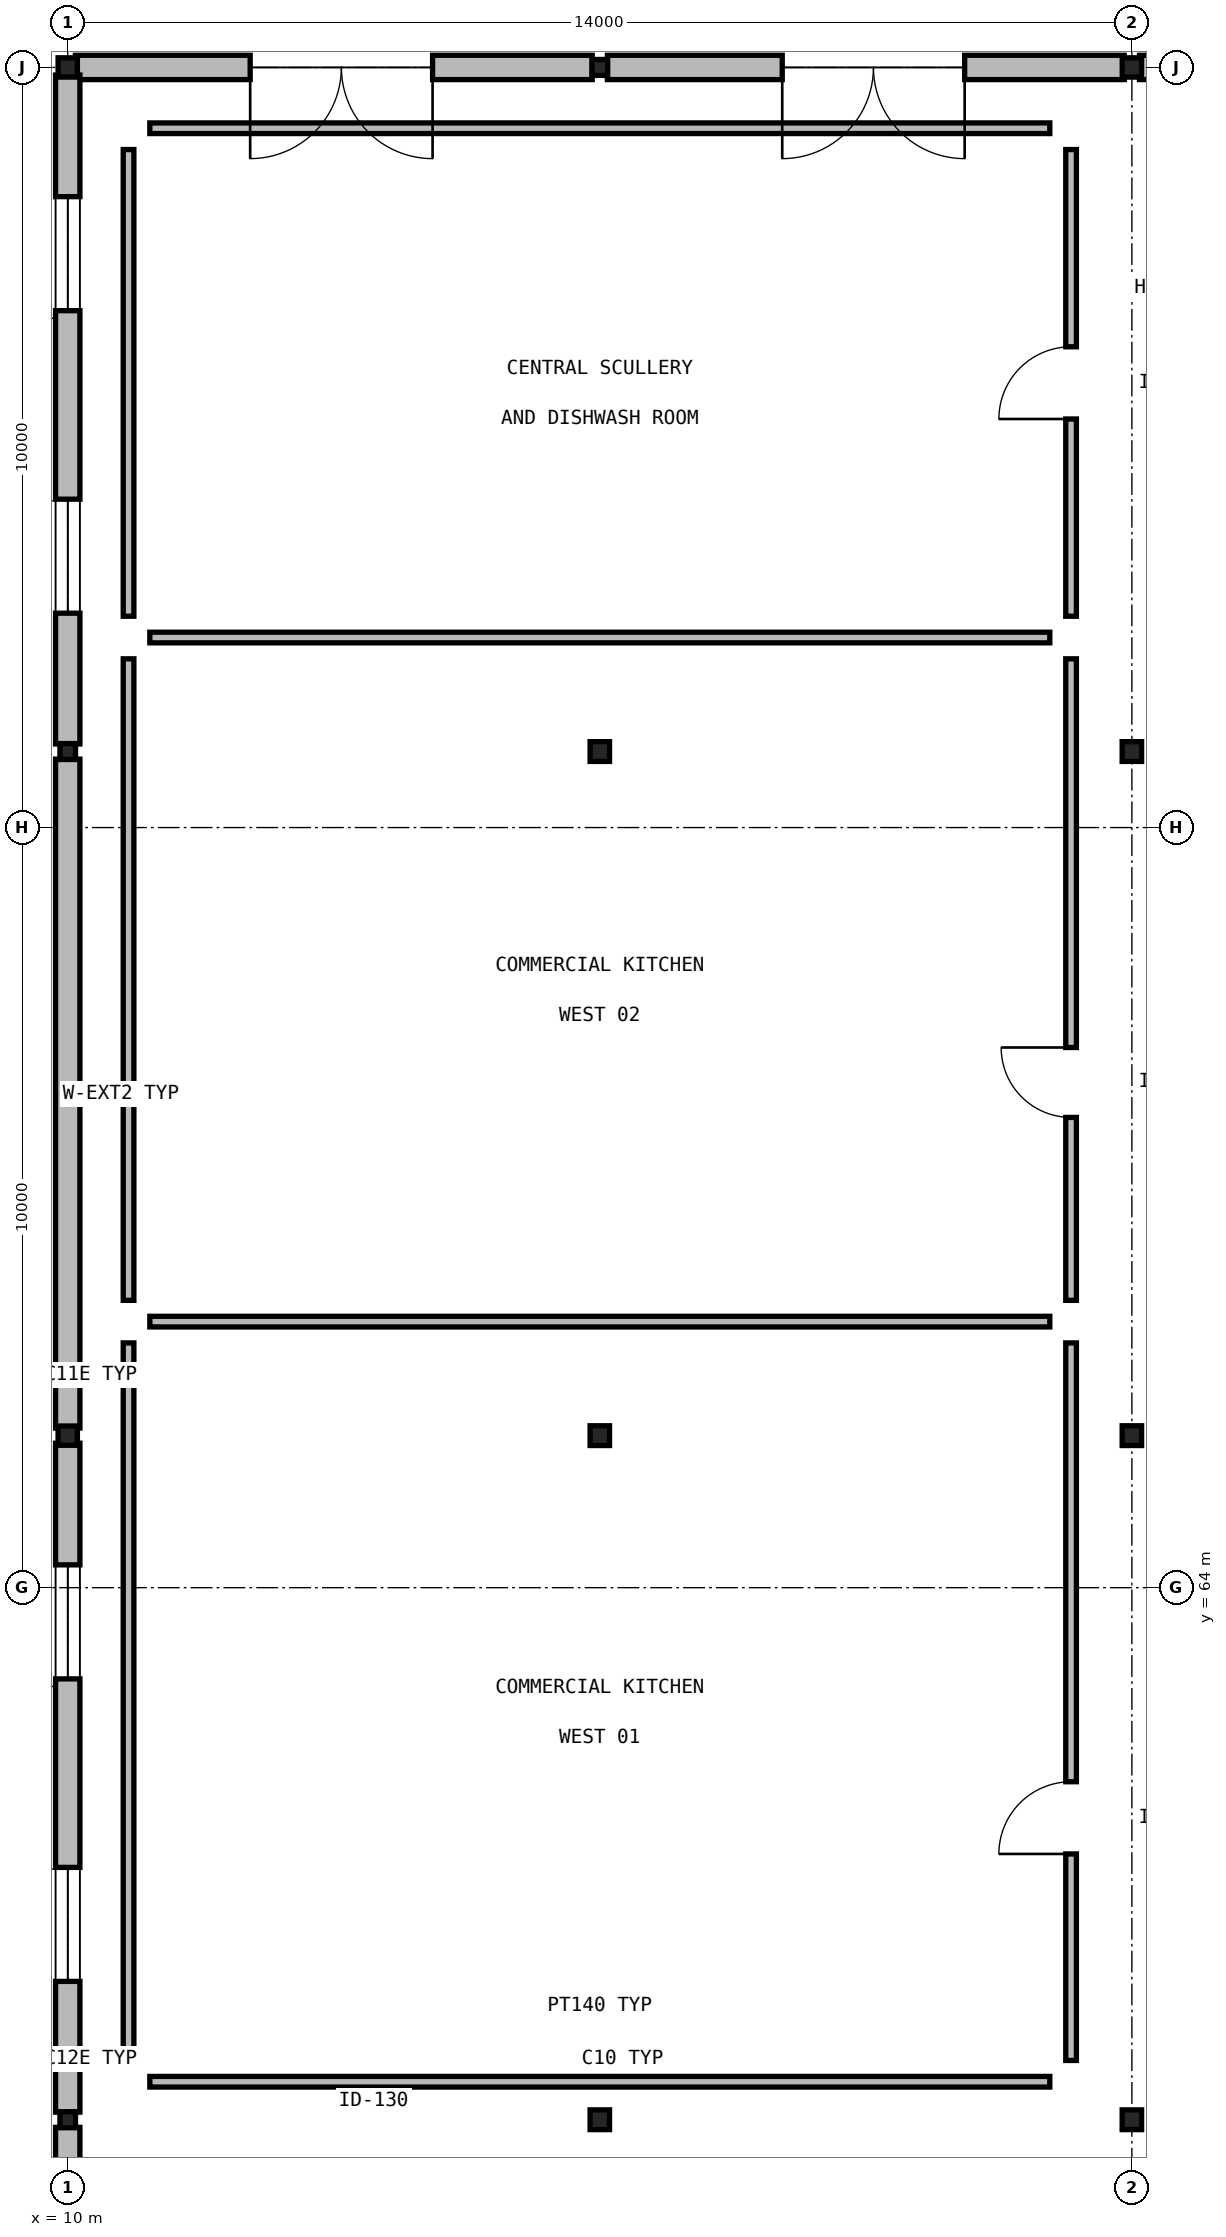
"""IFC4 building model, lengths in metres.
Left out: names, types, materials, properties, quantities, classifications, styles, units other than length and angle.
Written with IfcOpenShell. Run it as: python <this file> out.ifc"""

import sys

from ifc_helpers import new_model, si_unit, direction, frame, frame_2d, origin, origin_2d_with_axis, place, context, subcontext, project, spatial, rectangle, i_section, extrude, element, fill, save


model = new_model("IFC4")
c1 = context("Model", 3, precision=1e-05, world=origin(), true_north=direction((0.0, 1.0)))
c2 = subcontext(c1, "Body", "Model", "MODEL_VIEW")
j1 = project(units=[si_unit("LENGTHUNIT", "METRE"), si_unit("PLANEANGLEUNIT", "RADIAN")], contexts=[c1])
p1 = place(None, origin())
s1 = spatial("IfcSite", under=j1, at=p1, CompositionType="ELEMENT")
p2 = place(p1, origin())
s2 = spatial("IfcBuilding", under=s1, at=p2, CompositionType="ELEMENT")
p3 = place(p2, origin())
s3 = spatial("IfcBuildingStorey", under=s2, at=p3, CompositionType="ELEMENT", Elevation=0.0)
p4 = place(p3, frame((10.0, 57.0, -0.28), z_axis=(0.0, 0.0, 1.0), x_axis=(1.0, 0.0, 0.0)))
e1 = element("IfcColumn", 1, at=p4, inside=s3, PredefinedType="COLUMN", context=c2, shape_type="SweptSolid", body=[
    extrude(i_section(OverallWidth=0.205, OverallDepth=0.21, WebThickness=0.009, FlangeThickness=0.014, FilletRadius=0.011, at=origin_2d_with_axis()), origin(), (0.0, 0.0, 1.0), 4.78),
])
p5 = place(p3, frame((10.0, 66.0, -0.28), z_axis=(0.0, 0.0, 1.0), x_axis=(1.0, 0.0, 0.0)))
e2 = element("IfcColumn", 2, at=p5, inside=s3, PredefinedType="COLUMN", context=c2, shape_type="SweptSolid", body=[
    extrude(i_section(OverallWidth=0.254, OverallDepth=0.254, WebThickness=0.009, FlangeThickness=0.014, FilletRadius=0.014, at=origin_2d_with_axis()), origin(), (0.0, 0.0, 1.0), 4.78),
])
p6 = place(p3, frame((10.0, 75.0, -0.28), z_axis=(0.0, 0.0, 1.0), x_axis=(1.0, 0.0, 0.0)))
e3 = element("IfcColumn", 3, at=p6, inside=s3, PredefinedType="COLUMN", context=c2, shape_type="SweptSolid", body=[
    extrude(i_section(OverallWidth=0.205, OverallDepth=0.21, WebThickness=0.009, FlangeThickness=0.014, FilletRadius=0.011, at=origin_2d_with_axis()), origin(), (0.0, 0.0, 1.0), 4.78),
])
p7 = place(p3, frame((10.0, 84.0, -0.28), z_axis=(0.0, 0.0, 1.0), x_axis=(1.0, 0.0, 0.0)))
e4 = element("IfcColumn", 4, at=p7, inside=s3, PredefinedType="COLUMN", context=c2, shape_type="SweptSolid", body=[
    extrude(i_section(OverallWidth=0.254, OverallDepth=0.254, WebThickness=0.009, FlangeThickness=0.014, FilletRadius=0.014, at=origin_2d_with_axis()), origin(), (0.0, 0.0, 1.0), 4.78),
])
for number, where, z_axis, x_axis in (
    (5, (17.0, 57.0, -0.28), (0.0, 0.0, 1.0), (1.0, 0.0, 0.0)),
    (6, (17.0, 66.0, -0.28), (0.0, 0.0, 1.0), (1.0, 0.0, 0.0)),
    (7, (17.0, 75.0, -0.28), (0.0, 0.0, 1.0), (1.0, 0.0, 0.0)),
):
    element("IfcColumn", number, at=place(p3, frame(where, z_axis=z_axis, x_axis=x_axis)), inside=s3, PredefinedType="COLUMN", context=c2, shape_type="SweptSolid", body=[
        extrude(i_section(OverallWidth=0.256, OverallDepth=0.26, WebThickness=0.01, FlangeThickness=0.017, FilletRadius=0.014, at=origin_2d_with_axis()), origin(), (0.0, 0.0, 1.0), 4.78),
    ])
p8 = place(p3, frame((17.0, 84.0, -0.28), z_axis=(0.0, 0.0, 1.0), x_axis=(1.0, 0.0, 0.0)))
e8 = element("IfcColumn", 8, at=p8, inside=s3, PredefinedType="COLUMN", context=c2, shape_type="SweptSolid", body=[
    extrude(i_section(OverallWidth=0.205, OverallDepth=0.21, WebThickness=0.009, FlangeThickness=0.014, FilletRadius=0.011, at=origin_2d_with_axis()), origin(), (0.0, 0.0, 1.0), 4.78),
])
for number, where, z_axis, x_axis in (
    (9, (24.0, 57.0, -0.28), (0.0, 0.0, 1.0), (1.0, 0.0, 0.0)),
    (10, (24.0, 66.0, -0.28), (0.0, 0.0, 1.0), (1.0, 0.0, 0.0)),
    (11, (24.0, 75.0, -0.28), (0.0, 0.0, 1.0), (1.0, 0.0, 0.0)),
):
    element("IfcColumn", number, at=place(p3, frame(where, z_axis=z_axis, x_axis=x_axis)), inside=s3, PredefinedType="COLUMN", context=c2, shape_type="SweptSolid", body=[
        extrude(i_section(OverallWidth=0.256, OverallDepth=0.26, WebThickness=0.01, FlangeThickness=0.017, FilletRadius=0.014, at=origin_2d_with_axis()), origin(), (0.0, 0.0, 1.0), 4.78),
    ])
p9 = place(p3, frame((24.0, 84.0, -0.28), z_axis=(0.0, 0.0, 1.0), x_axis=(1.0, 0.0, 0.0)))
e12 = element("IfcColumn", 12, at=p9, inside=s3, PredefinedType="COLUMN", context=c2, shape_type="SweptSolid", body=[
    extrude(i_section(OverallWidth=0.254, OverallDepth=0.254, WebThickness=0.009, FlangeThickness=0.014, FilletRadius=0.014, at=origin_2d_with_axis()), origin(), (0.0, 0.0, 1.0), 4.78),
])
p10 = place(p3, frame((16.9, 84.0, 0.0), z_axis=(0.0, 0.0, 1.0), x_axis=(-1.0, 0.0, 0.0)))
e13 = element("IfcWall", 13, at=p10, inside=s3, PredefinedType="SOLIDWALL", context=c2, shape_type="SweptSolid", body=[
    extrude(rectangle(XDim=6.8, YDim=0.32, at=frame_2d((3.4, 0.0), x_axis=(1.0, 0.0))), origin(), (0.0, 0.0, 1.0), 3.88),
])
p11 = place(p10, frame((2.1, 0.0, 0.0)))
e14 = element("IfcOpeningElement", 14, at=p11, cuts=e13, PredefinedType="OPENING", context=c2, shape_type="SweptSolid", body=[
    extrude(rectangle(XDim=2.4, YDim=2.8, at=frame_2d((1.2, 1.4), x_axis=(1.0, 0.0))), frame((0.0, 0.17, 0.0), z_axis=(0.0, -1.0, 0.0), x_axis=(1.0, 0.0, 0.0)), (0.0, 0.0, 1.0), 0.34),
])
p12 = place(p3, frame((23.9, 84.0, 0.0), z_axis=(0.0, 0.0, 1.0), x_axis=(-1.0, 0.0, 0.0)))
e15 = element("IfcWall", 15, at=p12, inside=s3, PredefinedType="SOLIDWALL", context=c2, shape_type="SweptSolid", body=[
    extrude(rectangle(XDim=6.8, YDim=0.32, at=frame_2d((3.4, 0.0), x_axis=(1.0, 0.0))), origin(), (0.0, 0.0, 1.0), 3.88),
])
p13 = place(p12, frame((2.1, 0.0, 0.0)))
e16 = element("IfcOpeningElement", 16, at=p13, cuts=e15, PredefinedType="OPENING", context=c2, shape_type="SweptSolid", body=[
    extrude(rectangle(XDim=2.4, YDim=2.8, at=frame_2d((1.2, 1.4), x_axis=(1.0, 0.0))), frame((0.0, 0.17, 0.0), z_axis=(0.0, -1.0, 0.0), x_axis=(1.0, 0.0, 0.0)), (0.0, 0.0, 1.0), 0.34),
])
p14 = place(p3, frame((30.9, 84.0, 0.0), z_axis=(0.0, 0.0, 1.0), x_axis=(-1.0, 0.0, 0.0)))
e17 = element("IfcWall", 17, at=p14, inside=s3, PredefinedType="SOLIDWALL", context=c2, shape_type="SweptSolid", body=[
    extrude(rectangle(XDim=6.8, YDim=0.32, at=frame_2d((3.4, 0.0), x_axis=(1.0, 0.0))), origin(), (0.0, 0.0, 1.0), 3.88),
])
p15 = place(p14, frame((2.1, 0.0, 0.0)))
e18 = element("IfcOpeningElement", 18, at=p15, cuts=e17, PredefinedType="OPENING", context=c2, shape_type="SweptSolid", body=[
    extrude(rectangle(XDim=2.4, YDim=2.8, at=frame_2d((1.2, 1.4), x_axis=(1.0, 0.0))), frame((0.0, 0.17, 0.0), z_axis=(0.0, -1.0, 0.0), x_axis=(1.0, 0.0, 0.0)), (0.0, 0.0, 1.0), 0.34),
])
p16 = place(p3, frame((10.0, 56.9, 0.0), z_axis=(0.0, 0.0, 1.0), x_axis=(0.0, -1.0, 0.0)))
e19 = element("IfcWall", 19, at=p16, inside=s3, PredefinedType="SOLIDWALL", context=c2, shape_type="SweptSolid", body=[
    extrude(rectangle(XDim=8.8, YDim=0.32, at=frame_2d((4.4, 0.0), x_axis=(1.0, 0.0))), origin(), (0.0, 0.0, 1.0), 3.88),
])
p17 = place(p16, frame((1.6, 0.0, 1.05)))
e20 = element("IfcOpeningElement", 20, at=p17, cuts=e19, PredefinedType="OPENING", context=c2, shape_type="SweptSolid", body=[
    extrude(rectangle(XDim=1.5, YDim=1.6, at=frame_2d((0.75, 0.8), x_axis=(1.0, 0.0))), frame((0.0, 0.17, 0.0), z_axis=(0.0, -1.0, 0.0), x_axis=(1.0, 0.0, 0.0)), (0.0, 0.0, 1.0), 0.34),
])
p18 = place(p16, frame((5.58, 0.0, 1.05)))
e21 = element("IfcOpeningElement", 21, at=p18, cuts=e19, PredefinedType="OPENING", context=c2, shape_type="SweptSolid", body=[
    extrude(rectangle(XDim=1.5, YDim=1.6, at=frame_2d((0.75, 0.8), x_axis=(1.0, 0.0))), frame((0.0, 0.17, 0.0), z_axis=(0.0, -1.0, 0.0), x_axis=(1.0, 0.0, 0.0)), (0.0, 0.0, 1.0), 0.34),
])
p19 = place(p3, frame((10.0, 65.9, 0.0), z_axis=(0.0, 0.0, 1.0), x_axis=(0.0, -1.0, 0.0)))
e22 = element("IfcWall", 22, at=p19, inside=s3, PredefinedType="SOLIDWALL", context=c2, shape_type="SweptSolid", body=[
    extrude(rectangle(XDim=8.8, YDim=0.32, at=frame_2d((4.4, 0.0), x_axis=(1.0, 0.0))), origin(), (0.0, 0.0, 1.0), 3.88),
])
p20 = place(p19, frame((1.6, 0.0, 1.05)))
e23 = element("IfcOpeningElement", 23, at=p20, cuts=e22, PredefinedType="OPENING", context=c2, shape_type="SweptSolid", body=[
    extrude(rectangle(XDim=1.5, YDim=1.6, at=frame_2d((0.75, 0.8), x_axis=(1.0, 0.0))), frame((0.0, 0.17, 0.0), z_axis=(0.0, -1.0, 0.0), x_axis=(1.0, 0.0, 0.0)), (0.0, 0.0, 1.0), 0.34),
])
p21 = place(p19, frame((5.58, 0.0, 1.05)))
e24 = element("IfcOpeningElement", 24, at=p21, cuts=e22, PredefinedType="OPENING", context=c2, shape_type="SweptSolid", body=[
    extrude(rectangle(XDim=1.5, YDim=1.6, at=frame_2d((0.75, 0.8), x_axis=(1.0, 0.0))), frame((0.0, 0.17, 0.0), z_axis=(0.0, -1.0, 0.0), x_axis=(1.0, 0.0, 0.0)), (0.0, 0.0, 1.0), 0.34),
])
p22 = place(p3, frame((10.0, 74.9, 0.0), z_axis=(0.0, 0.0, 1.0), x_axis=(0.0, -1.0, 0.0)))
e25 = element("IfcWall", 25, at=p22, inside=s3, PredefinedType="SOLIDWALL", context=c2, shape_type="SweptSolid", body=[
    extrude(rectangle(XDim=8.8, YDim=0.32, at=frame_2d((4.4, 0.0), x_axis=(1.0, 0.0))), origin(), (0.0, 0.0, 1.0), 3.88),
])
p23 = place(p3, frame((10.0, 83.9, 0.0), z_axis=(0.0, 0.0, 1.0), x_axis=(0.0, -1.0, 0.0)))
e26 = element("IfcWall", 26, at=p23, inside=s3, PredefinedType="SOLIDWALL", context=c2, shape_type="SweptSolid", body=[
    extrude(rectangle(XDim=8.8, YDim=0.32, at=frame_2d((4.4, 0.0), x_axis=(1.0, 0.0))), origin(), (0.0, 0.0, 1.0), 3.88),
])
p24 = place(p23, frame((1.6, 0.0, 1.05)))
e27 = element("IfcOpeningElement", 27, at=p24, cuts=e26, PredefinedType="OPENING", context=c2, shape_type="SweptSolid", body=[
    extrude(rectangle(XDim=1.5, YDim=1.6, at=frame_2d((0.75, 0.8), x_axis=(1.0, 0.0))), frame((0.0, 0.17, 0.0), z_axis=(0.0, -1.0, 0.0), x_axis=(1.0, 0.0, 0.0)), (0.0, 0.0, 1.0), 0.34),
])
p25 = place(p23, frame((5.58, 0.0, 1.05)))
e28 = element("IfcOpeningElement", 28, at=p25, cuts=e26, PredefinedType="OPENING", context=c2, shape_type="SweptSolid", body=[
    extrude(rectangle(XDim=1.5, YDim=1.6, at=frame_2d((0.75, 0.8), x_axis=(1.0, 0.0))), frame((0.0, 0.17, 0.0), z_axis=(0.0, -1.0, 0.0), x_axis=(1.0, 0.0, 0.0)), (0.0, 0.0, 1.0), 0.34),
])
p26 = place(p3, frame((11.08, 57.5, 0.0), z_axis=(0.0, 0.0, 1.0), x_axis=(1.0, 0.0, 0.0)))
e29 = element("IfcWall", 29, at=p26, inside=s3, PredefinedType="PLUMBINGWALL", context=c2, shape_type="SweptSolid", body=[
    extrude(rectangle(XDim=11.84, YDim=0.14, at=frame_2d((5.92, 0.0), x_axis=(1.0, 0.0))), origin(), (0.0, 0.0, 1.0), 3.62),
])
p27 = place(p3, frame((23.2, 57.78, 0.0), z_axis=(0.0, 0.0, 1.0), x_axis=(0.0, 1.0, 0.0)))
e30 = element("IfcWall", 30, at=p27, inside=s3, PredefinedType="PLUMBINGWALL", context=c2, shape_type="SweptSolid", body=[
    extrude(rectangle(XDim=9.44, YDim=0.14, at=frame_2d((4.72, 0.0), x_axis=(1.0, 0.0))), origin(), (0.0, 0.0, 1.0), 3.62),
])
p28 = place(p27, frame((2.717, 0.0, 0.0)))
e31 = element("IfcOpeningElement", 31, at=p28, cuts=e30, PredefinedType="OPENING", context=c2, shape_type="SweptSolid", body=[
    extrude(rectangle(XDim=0.95, YDim=2.15, at=frame_2d((0.475, 1.075), x_axis=(1.0, 0.0))), frame((0.0, 0.08, 0.0), z_axis=(0.0, -1.0, 0.0), x_axis=(1.0, 0.0, 0.0)), (0.0, 0.0, 1.0), 0.16),
])
p29 = place(p3, frame((22.92, 67.5, 0.0), z_axis=(0.0, 0.0, 1.0), x_axis=(-1.0, 0.0, 0.0)))
e32 = element("IfcWall", 32, at=p29, inside=s3, PredefinedType="PLUMBINGWALL", context=c2, shape_type="SweptSolid", body=[
    extrude(rectangle(XDim=11.84, YDim=0.14, at=frame_2d((5.92, 0.0), x_axis=(1.0, 0.0))), origin(), (0.0, 0.0, 1.0), 3.62),
])
p30 = place(p3, frame((10.8, 67.22, 0.0), z_axis=(0.0, 0.0, 1.0), x_axis=(0.0, -1.0, 0.0)))
e33 = element("IfcWall", 33, at=p30, inside=s3, PredefinedType="PLUMBINGWALL", context=c2, shape_type="SweptSolid", body=[
    extrude(rectangle(XDim=9.44, YDim=0.14, at=frame_2d((4.72, 0.0), x_axis=(1.0, 0.0))), origin(), (0.0, 0.0, 1.0), 3.62),
])
p31 = place(p3, frame((23.2, 67.78, 0.0), z_axis=(0.0, 0.0, 1.0), x_axis=(0.0, 1.0, 0.0)))
e34 = element("IfcWall", 34, at=p31, inside=s3, PredefinedType="PLUMBINGWALL", context=c2, shape_type="SweptSolid", body=[
    extrude(rectangle(XDim=8.44, YDim=0.14, at=frame_2d((4.22, 0.0), x_axis=(1.0, 0.0))), origin(), (0.0, 0.0, 1.0), 3.62),
])
p32 = place(p31, frame((2.406, 0.0, 0.0)))
e35 = element("IfcOpeningElement", 35, at=p32, cuts=e34, PredefinedType="OPENING", context=c2, shape_type="SweptSolid", body=[
    extrude(rectangle(XDim=0.92, YDim=2.15, at=frame_2d((0.46, 1.075), x_axis=(1.0, 0.0))), frame((0.0, 0.08, 0.0), z_axis=(0.0, -1.0, 0.0), x_axis=(1.0, 0.0, 0.0)), (0.0, 0.0, 1.0), 0.16),
])
p33 = place(p3, frame((22.92, 76.5, 0.0), z_axis=(0.0, 0.0, 1.0), x_axis=(-1.0, 0.0, 0.0)))
e36 = element("IfcWall", 36, at=p33, inside=s3, PredefinedType="PLUMBINGWALL", context=c2, shape_type="SweptSolid", body=[
    extrude(rectangle(XDim=11.84, YDim=0.14, at=frame_2d((5.92, 0.0), x_axis=(1.0, 0.0))), origin(), (0.0, 0.0, 1.0), 3.62),
])
p34 = place(p3, frame((10.8, 76.22, 0.0), z_axis=(0.0, 0.0, 1.0), x_axis=(0.0, -1.0, 0.0)))
e37 = element("IfcWall", 37, at=p34, inside=s3, PredefinedType="PLUMBINGWALL", context=c2, shape_type="SweptSolid", body=[
    extrude(rectangle(XDim=8.44, YDim=0.14, at=frame_2d((4.22, 0.0), x_axis=(1.0, 0.0))), origin(), (0.0, 0.0, 1.0), 3.62),
])
p35 = place(p3, frame((23.2, 76.78, 0.0), z_axis=(0.0, 0.0, 1.0), x_axis=(0.0, 1.0, 0.0)))
e38 = element("IfcWall", 38, at=p35, inside=s3, PredefinedType="PLUMBINGWALL", context=c2, shape_type="SweptSolid", body=[
    extrude(rectangle(XDim=6.14, YDim=0.14, at=frame_2d((3.07, 0.0), x_axis=(1.0, 0.0))), origin(), (0.0, 0.0, 1.0), 3.62),
])
p36 = place(p35, frame((2.595, 0.0, 0.0)))
e39 = element("IfcOpeningElement", 39, at=p36, cuts=e38, PredefinedType="OPENING", context=c2, shape_type="SweptSolid", body=[
    extrude(rectangle(XDim=0.95, YDim=2.15, at=frame_2d((0.475, 1.075), x_axis=(1.0, 0.0))), frame((0.0, 0.08, 0.0), z_axis=(0.0, -1.0, 0.0), x_axis=(1.0, 0.0, 0.0)), (0.0, 0.0, 1.0), 0.16),
])
p37 = place(p3, frame((22.92, 83.2, 0.0), z_axis=(0.0, 0.0, 1.0), x_axis=(-1.0, 0.0, 0.0)))
e40 = element("IfcWall", 40, at=p37, inside=s3, PredefinedType="PLUMBINGWALL", context=c2, shape_type="SweptSolid", body=[
    extrude(rectangle(XDim=11.84, YDim=0.14, at=frame_2d((5.92, 0.0), x_axis=(1.0, 0.0))), origin(), (0.0, 0.0, 1.0), 3.62),
])
p38 = place(p3, frame((10.8, 82.92, 0.0), z_axis=(0.0, 0.0, 1.0), x_axis=(0.0, -1.0, 0.0)))
e41 = element("IfcWall", 41, at=p38, inside=s3, PredefinedType="PLUMBINGWALL", context=c2, shape_type="SweptSolid", body=[
    extrude(rectangle(XDim=6.14, YDim=0.14, at=frame_2d((3.07, 0.0), x_axis=(1.0, 0.0))), origin(), (0.0, 0.0, 1.0), 3.62),
])
p39 = place(p11, origin())
e42 = element("IfcDoor", 42, at=p39, inside=s3, OperationType="DOUBLE_SWING_RIGHT", PredefinedType="DOOR", context=c2, shape_type="SweptSolid", body=[
    extrude(rectangle(XDim=2.4, YDim=2.8, at=frame_2d((1.2, 1.4), x_axis=(1.0, 0.0))), frame((0.0, 0.025, 0.0), z_axis=(0.0, -1.0, 0.0), x_axis=(1.0, 0.0, 0.0)), (0.0, 0.0, 1.0), 0.05),
])
fill(e14, e42)
p40 = place(p13, origin())
e43 = element("IfcDoor", 43, at=p40, inside=s3, OperationType="DOUBLE_SWING_RIGHT", PredefinedType="DOOR", context=c2, shape_type="SweptSolid", body=[
    extrude(rectangle(XDim=2.4, YDim=2.8, at=frame_2d((1.2, 1.4), x_axis=(1.0, 0.0))), frame((0.0, 0.025, 0.0), z_axis=(0.0, -1.0, 0.0), x_axis=(1.0, 0.0, 0.0)), (0.0, 0.0, 1.0), 0.05),
])
fill(e16, e43)
p41 = place(p20, origin())
e44 = element("IfcWindow", 44, at=p41, inside=s3, PartitioningType="SINGLE_PANEL", PredefinedType="WINDOW", context=c2, shape_type="SweptSolid", body=[
    extrude(rectangle(XDim=1.5, YDim=1.6, at=frame_2d((0.75, 0.8), x_axis=(1.0, 0.0))), frame((0.0, 0.03, 0.0), z_axis=(0.0, -1.0, 0.0), x_axis=(1.0, 0.0, 0.0)), (0.0, 0.0, 1.0), 0.06),
])
fill(e23, e44)
p42 = place(p21, origin())
e45 = element("IfcWindow", 45, at=p42, inside=s3, PartitioningType="SINGLE_PANEL", PredefinedType="WINDOW", context=c2, shape_type="SweptSolid", body=[
    extrude(rectangle(XDim=1.5, YDim=1.6, at=frame_2d((0.75, 0.8), x_axis=(1.0, 0.0))), frame((0.0, 0.03, 0.0), z_axis=(0.0, -1.0, 0.0), x_axis=(1.0, 0.0, 0.0)), (0.0, 0.0, 1.0), 0.06),
])
fill(e24, e45)
p43 = place(p24, origin())
e46 = element("IfcWindow", 46, at=p43, inside=s3, PartitioningType="SINGLE_PANEL", PredefinedType="WINDOW", context=c2, shape_type="SweptSolid", body=[
    extrude(rectangle(XDim=1.5, YDim=1.6, at=frame_2d((0.75, 0.8), x_axis=(1.0, 0.0))), frame((0.0, 0.03, 0.0), z_axis=(0.0, -1.0, 0.0), x_axis=(1.0, 0.0, 0.0)), (0.0, 0.0, 1.0), 0.06),
])
fill(e27, e46)
p44 = place(p25, origin())
e47 = element("IfcWindow", 47, at=p44, inside=s3, PartitioningType="SINGLE_PANEL", PredefinedType="WINDOW", context=c2, shape_type="SweptSolid", body=[
    extrude(rectangle(XDim=1.5, YDim=1.6, at=frame_2d((0.75, 0.8), x_axis=(1.0, 0.0))), frame((0.0, 0.03, 0.0), z_axis=(0.0, -1.0, 0.0), x_axis=(1.0, 0.0, 0.0)), (0.0, 0.0, 1.0), 0.06),
])
fill(e28, e47)
p45 = place(p28, origin())
e48 = element("IfcDoor", 48, at=p45, inside=s3, OperationType="SINGLE_SWING_LEFT", PredefinedType="DOOR", context=c2, shape_type="SweptSolid", body=[
    extrude(rectangle(XDim=0.95, YDim=2.15, at=frame_2d((0.475, 1.075), x_axis=(1.0, 0.0))), frame((0.0, 0.025, 0.0), z_axis=(0.0, -1.0, 0.0), x_axis=(1.0, 0.0, 0.0)), (0.0, 0.0, 1.0), 0.05),
])
fill(e31, e48)
p46 = place(p32, origin())
e49 = element("IfcDoor", 49, at=p46, inside=s3, OperationType="SINGLE_SWING_RIGHT", PredefinedType="DOOR", context=c2, shape_type="SweptSolid", body=[
    extrude(rectangle(XDim=0.92, YDim=2.15, at=frame_2d((0.46, 1.075), x_axis=(1.0, 0.0))), frame((0.0, 0.025, 0.0), z_axis=(0.0, -1.0, 0.0), x_axis=(1.0, 0.0, 0.0)), (0.0, 0.0, 1.0), 0.05),
])
fill(e35, e49)
p47 = place(p36, origin())
e50 = element("IfcDoor", 50, at=p47, inside=s3, OperationType="SINGLE_SWING_LEFT", PredefinedType="DOOR", context=c2, shape_type="SweptSolid", body=[
    extrude(rectangle(XDim=0.95, YDim=2.15, at=frame_2d((0.475, 1.075), x_axis=(1.0, 0.0))), frame((0.0, 0.025, 0.0), z_axis=(0.0, -1.0, 0.0), x_axis=(1.0, 0.0, 0.0)), (0.0, 0.0, 1.0), 0.05),
])
fill(e39, e50)
save(model, sys.argv[1])
